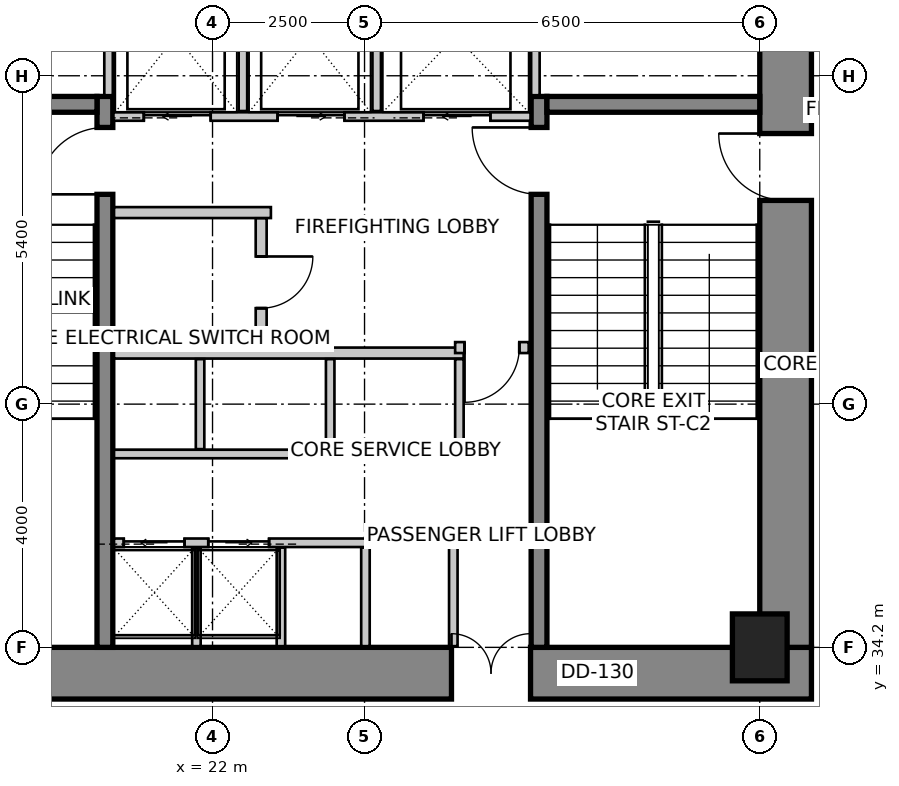
"""IFC4 building model, lengths in metres.
Left out: names, types, materials, properties, quantities, classifications, styles, units other than length and angle.
Written with IfcOpenShell. Run it as: python <this file> out.ifc"""

import sys

from ifc_helpers import new_model, si_unit, direction, frame, frame_2d, origin, origin_2d, place, context, subcontext, project, spatial, rectangle, extrude, source, transform, mapped, element, fill, save


model = new_model("IFC4")
c1 = context("Model", 3, precision=1e-05, world=origin(), true_north=direction((0.0, 1.0)))
c2 = subcontext(c1, "Body", "Model", "MODEL_VIEW")
j1 = project(units=[si_unit("LENGTHUNIT", "METRE"), si_unit("PLANEANGLEUNIT", "RADIAN")], contexts=[c1])
p1 = place(None, origin())
s1 = spatial("IfcSite", under=j1, at=p1, CompositionType="ELEMENT")
p2 = place(p1, origin())
s2 = spatial("IfcBuilding", under=s1, at=p2, CompositionType="ELEMENT")
p3 = place(p2, frame((0.0, 0.0, 27.0)))
s3 = spatial("IfcBuildingStorey", under=s2, at=p3, CompositionType="ELEMENT", Elevation=27.0)
p4 = place(p3, frame((15.75, 33.775, 0.0), z_axis=(0.0, 0.0, 1.0), x_axis=(1.0, 0.0, 0.0)))
e1 = element("IfcWall", 1, at=p4, inside=s3, PredefinedType="SHEAR", context=c2, shape_type="SweptSolid", body=[
    extrude(rectangle(XDim=16.1, YDim=0.85, at=frame_2d((8.05, 0.0))), origin(), (0.0, 0.0, 1.0), 4.0),
])
m1 = source(origin(), c2, "Body", "SweptSolid", [
    extrude(rectangle(XDim=1.3, YDim=2.15, at=frame_2d((0.65, 1.075))), frame((0.0, 0.435, 0.0), z_axis=(0.0, -1.0, 0.0), x_axis=(1.0, 0.0, 0.0)), (0.0, 0.0, 1.0), 0.87),
])
p5 = place(p4, frame((10.18, 0.0, 0.0)))
e2 = element("IfcOpeningElement", 2, at=p5, cuts=e1, PredefinedType="OPENING", context=c2, shape_type="MappedRepresentation", body=[
    mapped(m1, transform((0.0, 0.0, 0.0), scale=1.0)),
])
p6 = place(p3, frame((31.425, 34.2, 0.0), z_axis=(0.0, 0.0, 1.0), x_axis=(0.0, 1.0, 0.0)))
e3 = element("IfcWall", 3, at=p6, inside=s3, PredefinedType="SHEAR", context=c2, shape_type="SweptSolid", body=[
    extrude(rectangle(XDim=11.4, YDim=0.85, at=frame_2d((5.7, 0.0))), origin(), (0.0, 0.0, 1.0), 4.0),
])
m2 = source(origin(), c2, "Body", "SweptSolid", [
    extrude(rectangle(XDim=1.1, YDim=2.15, at=frame_2d((0.55, 1.075))), frame((0.0, 0.435, 0.0), z_axis=(0.0, -1.0, 0.0), x_axis=(1.0, 0.0, 0.0)), (0.0, 0.0, 1.0), 0.87),
])
p7 = place(p6, frame((7.35, 0.0, 0.0)))
e4 = element("IfcOpeningElement", 4, at=p7, cuts=e3, PredefinedType="OPENING", context=c2, shape_type="MappedRepresentation", body=[
    mapped(m2, transform((0.0, 0.0, 0.0), scale=1.0)),
])
p8 = place(p3, frame((20.23, 34.2, 0.0), z_axis=(0.0, 0.0, 1.0), x_axis=(0.0, 1.0, 0.0)))
e5 = element("IfcWall", 5, at=p8, inside=s3, PredefinedType="SHEAR", context=c2, shape_type="SweptSolid", body=[
    extrude(rectangle(XDim=9.06, YDim=0.26, at=frame_2d((4.53, 0.0))), origin(), (0.0, 0.0, 1.0), 4.0),
])
m3 = source(origin(), c2, "Body", "SweptSolid", [
    extrude(rectangle(XDim=1.1, YDim=2.15, at=frame_2d((0.55, 1.075))), frame((0.0, 0.14, 0.0), z_axis=(0.0, -1.0, 0.0), x_axis=(1.0, 0.0, 0.0)), (0.0, 0.0, 1.0), 0.28),
])
p9 = place(p8, frame((7.45, 0.0, 0.0)))
e6 = element("IfcOpeningElement", 6, at=p9, cuts=e5, PredefinedType="OPENING", context=c2, shape_type="MappedRepresentation", body=[
    mapped(m3, transform((0.0, 0.0, 0.0), scale=1.0)),
])
p10 = place(p3, frame((27.37, 34.2, 0.0), z_axis=(0.0, 0.0, 1.0), x_axis=(0.0, 1.0, 0.0)))
e7 = element("IfcWall", 7, at=p10, inside=s3, PredefinedType="SHEAR", context=c2, shape_type="SweptSolid", body=[
    extrude(rectangle(XDim=9.06, YDim=0.26, at=frame_2d((4.53, 0.0))), origin(), (0.0, 0.0, 1.0), 4.0),
])
p11 = place(p10, frame((7.45, 0.0, 0.0)))
e8 = element("IfcOpeningElement", 8, at=p11, cuts=e7, PredefinedType="OPENING", context=c2, shape_type="MappedRepresentation", body=[
    mapped(m3, transform((0.0, 0.0, 0.0), scale=1.0)),
])
for number, where, z_axis, x_axis in (
    (9, (16.6, 43.13, 0.0), (0.0, 0.0, 1.0), (1.0, 0.0, 0.0)),
    (10, (27.5, 43.13, 0.0), (0.0, 0.0, 1.0), (1.0, 0.0, 0.0)),
):
    element("IfcWall", number, at=place(p3, frame(where, z_axis=z_axis, x_axis=x_axis)), inside=s3, PredefinedType="SHEAR", context=c2, shape_type="SweptSolid", body=[
        extrude(rectangle(XDim=3.5, YDim=0.26, at=frame_2d((1.75, 0.0))), origin(), (0.0, 0.0, 1.0), 4.0),
    ])
m4 = source(origin(), c2, "Body", "SweptSolid", [
    extrude(rectangle(XDim=0.9, YDim=1.1, at=origin_2d()), origin(), (0.0, 0.0, 1.0), 4.0),
])
p12 = place(p3, frame((31.0, 34.2, 0.0), z_axis=(0.0, 0.0, 1.0), x_axis=(1.0, 0.0, 0.0)))
e11 = element("IfcColumn", 11, at=p12, inside=s3, PredefinedType="COLUMN", context=c2, shape_type="MappedRepresentation", body=[
    mapped(m4, transform((0.0, 0.0, 0.0), scale=1.0)),
])
p13 = place(p3, frame((20.37, 42.93, 0.0), z_axis=(0.0, 0.0, 1.0), x_axis=(1.0, 0.0, 0.0)))
e12 = element("IfcWall", 12, at=p13, inside=s3, PredefinedType="SOLIDWALL", context=c2, shape_type="SweptSolid", body=[
    extrude(rectangle(XDim=6.86, YDim=0.14, at=frame_2d((3.43, 0.0))), origin(), (0.0, 0.0, 1.0), 3.75),
])
m5 = source(origin(), c2, "Body", "SweptSolid", [
    extrude(rectangle(XDim=1.1, YDim=2.15, at=frame_2d((0.55, 1.075))), frame((0.0, 0.08, 0.0), z_axis=(0.0, -1.0, 0.0), x_axis=(1.0, 0.0, 0.0)), (0.0, 0.0, 1.0), 0.16),
])
p14 = place(p13, frame((0.5, 0.0, 0.0)))
e13 = element("IfcOpeningElement", 13, at=p14, cuts=e12, PredefinedType="OPENING", context=c2, shape_type="MappedRepresentation", body=[
    mapped(m5, transform((0.0, 0.0, 0.0), scale=1.0)),
])
p15 = place(p13, frame((2.7, 0.0, 0.0)))
e14 = element("IfcOpeningElement", 14, at=p15, cuts=e12, PredefinedType="OPENING", context=c2, shape_type="MappedRepresentation", body=[
    mapped(m5, transform((0.0, 0.0, 0.0), scale=1.0)),
])
p16 = place(p13, frame((5.1, 0.0, 0.0)))
e15 = element("IfcOpeningElement", 15, at=p16, cuts=e12, PredefinedType="OPENING", context=c2, shape_type="MappedRepresentation", body=[
    mapped(m5, transform((0.0, 0.0, 0.0), scale=1.0)),
])
for number, where, z_axis, x_axis in (
    (16, (20.29, 43.28, 0.0), (0.0, 0.0, 1.0), (0.0, 1.0, 0.0)),
    (17, (27.31, 43.28, 0.0), (0.0, 0.0, 1.0), (0.0, 1.0, 0.0)),
):
    element("IfcWall", number, at=place(p3, frame(where, z_axis=z_axis, x_axis=x_axis)), inside=s3, PredefinedType="SOLIDWALL", context=c2, shape_type="SweptSolid", body=[
        extrude(rectangle(XDim=2.3, YDim=0.14, at=frame_2d((1.15, 0.0))), origin(), (0.0, 0.0, 1.0), 3.75),
    ])
for number, where, z_axis, x_axis in (
    (18, (22.5, 43.02, 0.0), (0.0, 0.0, 1.0), (0.0, 1.0, 0.0)),
    (19, (24.7, 43.02, 0.0), (0.0, 0.0, 1.0), (0.0, 1.0, 0.0)),
):
    element("IfcWall", number, at=place(p3, frame(where, z_axis=z_axis, x_axis=x_axis)), inside=s3, PredefinedType="SOLIDWALL", context=c2, shape_type="SweptSolid", body=[
        extrude(rectangle(XDim=2.56, YDim=0.14, at=frame_2d((1.28, 0.0))), origin(), (0.0, 0.0, 1.0), 3.75),
    ])
p17 = place(p3, frame((20.38, 35.92, 0.0), z_axis=(0.0, 0.0, 1.0), x_axis=(1.0, 0.0, 0.0)))
e20 = element("IfcWall", 20, at=p17, inside=s3, PredefinedType="SOLIDWALL", context=c2, shape_type="SweptSolid", body=[
    extrude(rectangle(XDim=5.65, YDim=0.14, at=frame_2d((2.825, 0.0))), origin(), (0.0, 0.0, 1.0), 3.75),
])
m6 = source(origin(), c2, "Body", "SweptSolid", [
    extrude(rectangle(XDim=1.0, YDim=2.15, at=frame_2d((0.5, 1.075))), frame((0.0, 0.08, 0.0), z_axis=(0.0, -1.0, 0.0), x_axis=(1.0, 0.0, 0.0)), (0.0, 0.0, 1.0), 0.16),
])
p18 = place(p17, frame((0.16, 0.0, 0.0)))
e21 = element("IfcOpeningElement", 21, at=p18, cuts=e20, PredefinedType="OPENING", context=c2, shape_type="MappedRepresentation", body=[
    mapped(m6, transform((0.0, 0.0, 0.0), scale=1.0)),
])
p19 = place(p17, frame((1.55, 0.0, 0.0)))
e22 = element("IfcOpeningElement", 22, at=p19, cuts=e20, PredefinedType="OPENING", context=c2, shape_type="MappedRepresentation", body=[
    mapped(m6, transform((0.0, 0.0, 0.0), scale=1.0)),
])
for number, where, z_axis, x_axis in (
    (23, (25.96, 34.22, 0.0), (0.0, 0.0, 1.0), (0.0, 1.0, 0.0)),
    (24, (21.735, 34.22, 0.0), (0.0, 0.0, 1.0), (0.0, 1.0, 0.0)),
    (25, (23.125, 34.22, 0.0), (0.0, 0.0, 1.0), (0.0, 1.0, 0.0)),
    (26, (24.515, 34.22, 0.0), (0.0, 0.0, 1.0), (0.0, 1.0, 0.0)),
):
    element("IfcWall", number, at=place(p3, frame(where, z_axis=z_axis, x_axis=x_axis)), inside=s3, PredefinedType="SOLIDWALL", context=c2, shape_type="SweptSolid", body=[
        extrude(rectangle(XDim=1.62, YDim=0.14, at=frame_2d((0.81, 0.0))), origin(), (0.0, 0.0, 1.0), 3.042),
    ])
p20 = place(p3, frame((20.38, 37.38, 0.0), z_axis=(0.0, 0.0, 1.0), x_axis=(1.0, 0.0, 0.0)))
e27 = element("IfcWall", 27, at=p20, inside=s3, PredefinedType="SOLIDWALL", context=c2, shape_type="SweptSolid", body=[
    extrude(rectangle(XDim=5.75, YDim=0.14, at=frame_2d((2.875, 0.0))), origin(), (0.0, 0.0, 1.0), 3.75),
])
p21 = place(p3, frame((20.38, 39.04, 0.0), z_axis=(0.0, 0.0, 1.0), x_axis=(1.0, 0.0, 0.0)))
e28 = element("IfcWall", 28, at=p21, inside=s3, PredefinedType="SOLIDWALL", context=c2, shape_type="SweptSolid", body=[
    extrude(rectangle(XDim=5.75, YDim=0.18, at=frame_2d((2.875, 0.0))), origin(), (0.0, 0.0, 1.0), 3.75),
])
for number, where, z_axis, x_axis in (
    (29, (26.06, 37.46, 0.0), (0.0, 0.0, 1.0), (0.0, 1.0, 0.0)),
    (30, (21.795, 37.46, 0.0), (0.0, 0.0, 1.0), (0.0, 1.0, 0.0)),
    (31, (23.935, 37.46, 0.0), (0.0, 0.0, 1.0), (0.0, 1.0, 0.0)),
):
    element("IfcWall", number, at=place(p3, frame(where, z_axis=z_axis, x_axis=x_axis)), inside=s3, PredefinedType="SOLIDWALL", context=c2, shape_type="SweptSolid", body=[
        extrude(rectangle(XDim=1.48, YDim=0.14, at=frame_2d((0.74, 0.0))), origin(), (0.0, 0.0, 1.0), 3.75),
    ])
p22 = place(p3, frame((22.96, 41.35, 0.0), z_axis=(0.0, 0.0, 1.0), x_axis=(-1.0, 0.0, 0.0)))
e32 = element("IfcWall", 32, at=p22, inside=s3, PredefinedType="PARTITIONING", context=c2, shape_type="SweptSolid", body=[
    extrude(rectangle(XDim=2.58, YDim=0.18, at=frame_2d((1.29, 0.0))), origin(), (0.0, 0.0, 1.0), 3.75),
])
p23 = place(p3, frame((22.8, 41.256, 0.0), z_axis=(0.0, 0.0, 1.0), x_axis=(0.0, -1.0, 0.0)))
e33 = element("IfcWall", 33, at=p23, inside=s3, PredefinedType="PARTITIONING", context=c2, shape_type="SweptSolid", body=[
    extrude(rectangle(XDim=2.106, YDim=0.18, at=frame_2d((1.053, 0.0))), origin(), (0.0, 0.0, 1.0), 3.75),
])
m7 = source(origin(), c2, "Body", "SweptSolid", [
    extrude(rectangle(XDim=0.85, YDim=2.15, at=frame_2d((0.425, 1.075))), frame((0.0, 0.1, 0.0), z_axis=(0.0, -1.0, 0.0), x_axis=(1.0, 0.0, 0.0)), (0.0, 0.0, 1.0), 0.2),
])
p24 = place(p23, frame((0.628, 0.0, 0.0)))
e34 = element("IfcOpeningElement", 34, at=p24, cuts=e33, PredefinedType="OPENING", context=c2, shape_type="MappedRepresentation", body=[
    mapped(m7, transform((0.0, 0.0, 0.0), scale=1.0)),
])
p25 = place(p3, frame((27.2, 39.13, 0.0), z_axis=(0.0, 0.0, 1.0), x_axis=(-1.0, 0.0, 0.0)))
e35 = element("IfcWall", 35, at=p25, inside=s3, PredefinedType="PARTITIONING", context=c2, shape_type="SweptSolid", body=[
    extrude(rectangle(XDim=1.21, YDim=0.18, at=frame_2d((0.605, 0.0))), origin(), (0.0, 0.0, 1.0), 3.75),
])
m8 = source(origin(), c2, "Body", "SweptSolid", [
    extrude(rectangle(XDim=0.9, YDim=2.15, at=frame_2d((0.45, 1.075))), frame((0.0, 0.1, 0.0), z_axis=(0.0, -1.0, 0.0), x_axis=(1.0, 0.0, 0.0)), (0.0, 0.0, 1.0), 0.2),
])
p26 = place(p25, frame((0.155, 0.0, 0.0)))
e36 = element("IfcOpeningElement", 36, at=p26, cuts=e35, PredefinedType="OPENING", context=c2, shape_type="MappedRepresentation", body=[
    mapped(m8, transform((0.0, 0.0, 0.0), scale=1.0)),
])
m9 = source(origin(), c2, "Body", "SweptSolid", [
    extrude(rectangle(XDim=1.1, YDim=2.15, at=frame_2d((0.55, 1.075))), frame((0.0, 0.025, 0.0), z_axis=(0.0, -1.0, 0.0), x_axis=(1.0, 0.0, 0.0)), (0.0, 0.0, 1.0), 0.05),
])
p27 = place(p14, origin())
e37 = element("IfcDoor", 37, at=p27, inside=s3, OperationType="SLIDING_TO_LEFT", PredefinedType="DOOR", context=c2, shape_type="MappedRepresentation", body=[
    mapped(m9, transform((0.0, 0.0, 0.0), scale=1.0)),
])
fill(e13, e37)
p28 = place(p15, origin())
e38 = element("IfcDoor", 38, at=p28, inside=s3, OperationType="SLIDING_TO_RIGHT", PredefinedType="DOOR", context=c2, shape_type="MappedRepresentation", body=[
    mapped(m9, transform((0.0, 0.0, 0.0), scale=1.0)),
])
fill(e14, e38)
m10 = source(origin(), c2, "Body", "SweptSolid", [
    extrude(rectangle(XDim=1.1, YDim=2.15, at=frame_2d((0.55, 1.075))), frame((0.0, 0.025, 0.0), z_axis=(0.0, -1.0, 0.0), x_axis=(1.0, 0.0, 0.0)), (0.0, 0.0, 1.0), 0.05),
])
p29 = place(p16, origin())
e39 = element("IfcDoor", 39, at=p29, inside=s3, OperationType="SLIDING_TO_LEFT", PredefinedType="DOOR", context=c2, shape_type="MappedRepresentation", body=[
    mapped(m10, transform((0.0, 0.0, 0.0), scale=1.0)),
])
fill(e15, e39)
m11 = source(origin(), c2, "Body", "SweptSolid", [
    extrude(rectangle(XDim=1.0, YDim=2.15, at=frame_2d((0.5, 1.075))), frame((0.0, 0.025, 0.0), z_axis=(0.0, -1.0, 0.0), x_axis=(1.0, 0.0, 0.0)), (0.0, 0.0, 1.0), 0.05),
])
p30 = place(p18, origin())
e40 = element("IfcDoor", 40, at=p30, inside=s3, OperationType="SLIDING_TO_LEFT", PredefinedType="DOOR", context=c2, shape_type="MappedRepresentation", body=[
    mapped(m11, transform((0.0, 0.0, 0.0), scale=1.0)),
])
fill(e21, e40)
p31 = place(p19, origin())
e41 = element("IfcDoor", 41, at=p31, inside=s3, OperationType="SLIDING_TO_RIGHT", PredefinedType="DOOR", context=c2, shape_type="MappedRepresentation", body=[
    mapped(m11, transform((0.0, 0.0, 0.0), scale=1.0)),
])
fill(e22, e41)
m12 = source(origin(), c2, "Body", "SweptSolid", [
    extrude(rectangle(XDim=1.1, YDim=2.15, at=frame_2d((0.55, 1.075))), frame((0.0, 0.025, 0.0), z_axis=(0.0, -1.0, 0.0), x_axis=(1.0, 0.0, 0.0)), (0.0, 0.0, 1.0), 0.05),
])
p32 = place(p9, origin())
e42 = element("IfcDoor", 42, at=p32, inside=s3, OperationType="SINGLE_SWING_LEFT", PredefinedType="DOOR", context=c2, shape_type="MappedRepresentation", body=[
    mapped(m12, transform((0.0, 0.0, 0.0), scale=1.0)),
])
fill(e6, e42)
p33 = place(p11, origin())
e43 = element("IfcDoor", 43, at=p33, inside=s3, OperationType="SINGLE_SWING_RIGHT", PredefinedType="DOOR", context=c2, shape_type="MappedRepresentation", body=[
    mapped(m12, transform((0.0, 0.0, 0.0), scale=1.0)),
])
fill(e8, e43)
p34 = place(p7, origin())
e44 = element("IfcDoor", 44, at=p34, inside=s3, OperationType="SINGLE_SWING_RIGHT", PredefinedType="DOOR", context=c2, shape_type="MappedRepresentation", body=[
    mapped(m12, transform((0.0, 0.0, 0.0), scale=1.0)),
])
fill(e4, e44)
m13 = source(origin(), c2, "Body", "SweptSolid", [
    extrude(rectangle(XDim=1.3, YDim=2.15, at=frame_2d((0.65, 1.075))), frame((0.0, 0.025, 0.0), z_axis=(0.0, -1.0, 0.0), x_axis=(1.0, 0.0, 0.0)), (0.0, 0.0, 1.0), 0.05),
])
p35 = place(p5, origin())
e45 = element("IfcDoor", 45, at=p35, inside=s3, OperationType="DOUBLE_DOOR_SINGLE_SWING", PredefinedType="DOOR", context=c2, shape_type="MappedRepresentation", body=[
    mapped(m13, transform((0.0, 0.0, 0.0), scale=1.0)),
])
fill(e2, e45)
m14 = source(origin(), c2, "Body", "SweptSolid", [
    extrude(rectangle(XDim=0.85, YDim=2.15, at=frame_2d((0.425, 1.075))), frame((0.0, 0.025, 0.0), z_axis=(0.0, -1.0, 0.0), x_axis=(1.0, 0.0, 0.0)), (0.0, 0.0, 1.0), 0.05),
])
p36 = place(p24, origin())
e46 = element("IfcDoor", 46, at=p36, inside=s3, OperationType="SINGLE_SWING_LEFT", PredefinedType="DOOR", context=c2, shape_type="MappedRepresentation", body=[
    mapped(m14, transform((0.0, 0.0, 0.0), scale=1.0)),
])
fill(e34, e46)
m15 = source(origin(), c2, "Body", "SweptSolid", [
    extrude(rectangle(XDim=0.9, YDim=2.15, at=frame_2d((0.45, 1.075))), frame((0.0, 0.025, 0.0), z_axis=(0.0, -1.0, 0.0), x_axis=(1.0, 0.0, 0.0)), (0.0, 0.0, 1.0), 0.05),
])
p37 = place(p26, origin())
e47 = element("IfcDoor", 47, at=p37, inside=s3, OperationType="SINGLE_SWING_RIGHT", PredefinedType="DOOR", context=c2, shape_type="MappedRepresentation", body=[
    mapped(m15, transform((0.0, 0.0, 0.0), scale=1.0)),
])
fill(e36, e47)
save(model, sys.argv[1])
